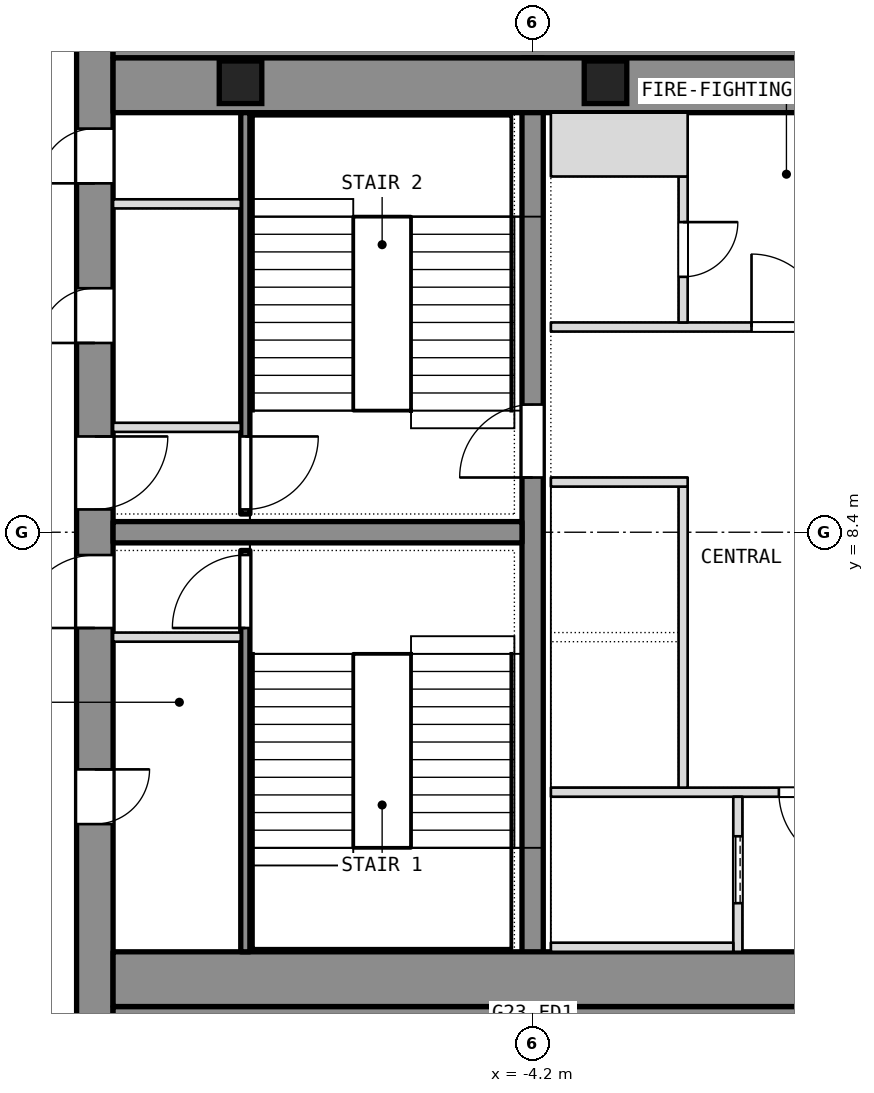
"""IFC4 building model, lengths in metres.
Left out: names, types, materials, properties, quantities, classifications, styles, units other than length and angle.
Written with IfcOpenShell. Run it as: python <this file> out.ifc"""

import sys

from ifc_helpers import new_model, si_unit, direction, frame, frame_2d, origin, origin_2d, place, context, subcontext, project, spatial, rectangle, extrude, element, fill, save


model = new_model("IFC4")
c1 = context("Model", 3, precision=1e-05, world=origin(), true_north=direction((0.0, 1.0)))
c2 = subcontext(c1, "Body", "Model", "MODEL_VIEW")
j1 = project(units=[si_unit("LENGTHUNIT", "METRE"), si_unit("PLANEANGLEUNIT", "RADIAN")], contexts=[c1])
p1 = place(None, origin())
s1 = spatial("IfcSite", under=j1, at=p1, CompositionType="ELEMENT")
p2 = place(p1, origin())
s2 = spatial("IfcBuilding", under=s1, at=p2, CompositionType="ELEMENT")
p3 = place(p2, frame((0.0, 0.0, 270.5)))
s3 = spatial("IfcBuildingStorey", under=s2, at=p3, CompositionType="ELEMENT", Elevation=270.5)
p4 = place(p3, frame((-11.4, 0.0, 0.0), z_axis=(0.0, 0.0, 1.0), x_axis=(0.0, 1.0, 0.0)))
e1 = element("IfcWall", 1, at=p4, inside=s3, PredefinedType="SHEAR", context=c2, shape_type="SweptSolid", body=[
    extrude(rectangle(XDim=16.8, YDim=0.6, at=frame_2d((8.4, 0.0))), origin(), (0.0, 0.0, 1.0), 3.6),
])
p5 = place(p4, frame((3.6, 0.0, 0.0)))
e2 = element("IfcOpeningElement", 2, at=p5, cuts=e1, PredefinedType="OPENING", context=c2, shape_type="SweptSolid", body=[
    extrude(rectangle(XDim=0.9, YDim=2.1, at=frame_2d((0.45, 1.05))), frame((0.0, 0.3, 0.0), z_axis=(0.0, -1.0, 0.0), x_axis=(1.0, 0.0, 0.0)), (0.0, 0.0, 1.0), 0.6),
])
p6 = place(p4, frame((6.825, 0.0, 0.0)))
e3 = element("IfcOpeningElement", 3, at=p6, cuts=e1, PredefinedType="OPENING", context=c2, shape_type="SweptSolid", body=[
    extrude(rectangle(XDim=1.2, YDim=2.1, at=frame_2d((0.6, 1.05))), frame((0.0, 0.3, 0.0), z_axis=(0.0, -1.0, 0.0), x_axis=(1.0, 0.0, 0.0)), (0.0, 0.0, 1.0), 0.6),
])
p7 = place(p4, frame((14.137, 0.0, 0.0)))
e4 = element("IfcOpeningElement", 4, at=p7, cuts=e1, PredefinedType="OPENING", context=c2, shape_type="SweptSolid", body=[
    extrude(rectangle(XDim=0.9, YDim=2.1, at=frame_2d((0.45, 1.05))), frame((0.0, 0.3, 0.0), z_axis=(0.0, -1.0, 0.0), x_axis=(1.0, 0.0, 0.0)), (0.0, 0.0, 1.0), 0.6),
])
p8 = place(p4, frame((11.512, 0.0, 0.0)))
e5 = element("IfcOpeningElement", 5, at=p8, cuts=e1, PredefinedType="OPENING", context=c2, shape_type="SweptSolid", body=[
    extrude(rectangle(XDim=0.9, YDim=2.1, at=frame_2d((0.45, 1.05))), frame((0.0, 0.3, 0.0), z_axis=(0.0, -1.0, 0.0), x_axis=(1.0, 0.0, 0.0)), (0.0, 0.0, 1.0), 0.6),
])
p9 = place(p4, frame((8.775, 0.0, 0.0)))
e6 = element("IfcOpeningElement", 6, at=p9, cuts=e1, PredefinedType="OPENING", context=c2, shape_type="SweptSolid", body=[
    extrude(rectangle(XDim=1.2, YDim=2.1, at=frame_2d((0.6, 1.05))), frame((0.0, 0.3, 0.0), z_axis=(0.0, -1.0, 0.0), x_axis=(1.0, 0.0, 0.0)), (0.0, 0.0, 1.0), 0.6),
])
for number, where, z_axis, x_axis in (
    (7, (-11.1, 0.3, 0.0), (0.0, 0.0, 1.0), (1.0, 0.0, 0.0)),
    (8, (-11.1, 16.5, 0.0), (0.0, 0.0, 1.0), (1.0, 0.0, 0.0)),
):
    element("IfcWall", number, at=place(p3, frame(where, z_axis=z_axis, x_axis=x_axis)), inside=s3, PredefinedType="SHEAR", context=c2, shape_type="SweptSolid", body=[
        extrude(rectangle(XDim=22.2, YDim=0.6, at=frame_2d((11.1, 0.0))), origin(), (0.0, 0.0, 1.0), 3.6),
    ])
p10 = place(p3, frame((-4.2, 0.6, 0.0), z_axis=(0.0, 0.0, 1.0), x_axis=(0.0, 1.0, 0.0)))
e9 = element("IfcWall", 9, at=p10, inside=s3, PredefinedType="SHEAR", context=c2, shape_type="SweptSolid", body=[
    extrude(rectangle(XDim=15.6, YDim=0.35, at=frame_2d((7.8, 0.0))), origin(), (0.0, 0.0, 1.0), 3.6),
])
p11 = place(p10, frame((8.7, 0.0, 0.0)))
e10 = element("IfcOpeningElement", 10, at=p11, cuts=e9, PredefinedType="OPENING", context=c2, shape_type="SweptSolid", body=[
    extrude(rectangle(XDim=1.2, YDim=2.1, at=frame_2d((0.6, 1.05))), frame((0.0, 0.175, 0.0), z_axis=(0.0, -1.0, 0.0), x_axis=(1.0, 0.0, 0.0)), (0.0, 0.0, 1.0), 0.35),
])
p12 = place(p3, frame((-11.1, 8.4, 0.0), z_axis=(0.0, 0.0, 1.0), x_axis=(1.0, 0.0, 0.0)))
e11 = element("IfcWall", 11, at=p12, inside=s3, PredefinedType="SHEAR", context=c2, shape_type="SweptSolid", body=[
    extrude(rectangle(XDim=6.725, YDim=0.35, at=frame_2d((3.363, 0.0))), origin(), (0.0, 0.0, 1.0), 3.6),
])
for number, where, z_axis, x_axis in (
    (12, (-9.004, 15.8, 0.0), (0.0, 0.0, 1.0), (1.0, 0.0, 0.0)),
    (13, (-3.001, 15.8, 0.0), (0.0, 0.0, 1.0), (1.0, 0.0, 0.0)),
):
    element("IfcColumn", number, at=place(p3, frame(where, z_axis=z_axis, x_axis=x_axis)), inside=s3, PredefinedType="COLUMN", context=c2, shape_type="SweptSolid", body=[
        extrude(rectangle(XDim=0.7, YDim=0.7, at=origin_2d()), origin(), (0.0, 0.0, 1.0), 3.6),
    ])
for number, where, z_axis, x_axis in (
    (14, (-11.1, 1.05, 0.0), (0.0, 0.0, 1.0), (1.0, 0.0, 0.0)),
    (15, (-11.1, 15.75, 0.0), (0.0, 0.0, 1.0), (1.0, 0.0, 0.0)),
):
    element("IfcWall", number, at=place(p3, frame(where, z_axis=z_axis, x_axis=x_axis)), inside=s3, PredefinedType="PARTITIONING", context=c2, shape_type="SweptSolid", body=[
        extrude(rectangle(XDim=22.2, YDim=0.9, at=frame_2d((11.1, 0.0))), origin(), (0.0, 0.0, 1.0), 3.34),
    ])
p13 = place(p3, frame((-8.925, 1.5, 0.0), z_axis=(0.0, 0.0, 1.0), x_axis=(0.0, 1.0, 0.0)))
e16 = element("IfcWall", 16, at=p13, inside=s3, PredefinedType="SHEAR", context=c2, shape_type="SweptSolid", body=[
    extrude(rectangle(XDim=6.6, YDim=0.15, at=frame_2d((3.3, 0.0))), origin(), (0.0, 0.0, 1.0), 3.34),
])
p14 = place(p13, frame((5.325, 0.0, 0.0)))
e17 = element("IfcOpeningElement", 17, at=p14, cuts=e16, PredefinedType="OPENING", context=c2, shape_type="SweptSolid", body=[
    extrude(rectangle(XDim=1.2, YDim=2.1, at=frame_2d((0.6, 1.05))), frame((0.0, 0.075, 0.0), z_axis=(0.0, -1.0, 0.0), x_axis=(1.0, 0.0, 0.0)), (0.0, 0.0, 1.0), 0.15),
])
p15 = place(p3, frame((-11.1, 6.675, 0.0), z_axis=(0.0, 0.0, 1.0), x_axis=(1.0, 0.0, 0.0)))
e18 = element("IfcWall", 18, at=p15, inside=s3, PredefinedType="PARTITIONING", context=c2, shape_type="SweptSolid", body=[
    extrude(rectangle(XDim=2.1, YDim=0.15, at=frame_2d((1.05, 0.0))), origin(), (0.0, 0.0, 1.0), 3.34),
])
p16 = place(p3, frame((-8.925, 8.7, 0.0), z_axis=(0.0, 0.0, 1.0), x_axis=(0.0, 1.0, 0.0)))
e19 = element("IfcWall", 19, at=p16, inside=s3, PredefinedType="SHEAR", context=c2, shape_type="SweptSolid", body=[
    extrude(rectangle(XDim=6.6, YDim=0.15, at=frame_2d((3.3, 0.0))), origin(), (0.0, 0.0, 1.0), 3.34),
])
p17 = place(p16, frame((0.075, 0.0, 0.0)))
e20 = element("IfcOpeningElement", 20, at=p17, cuts=e19, PredefinedType="OPENING", context=c2, shape_type="SweptSolid", body=[
    extrude(rectangle(XDim=1.2, YDim=2.1, at=frame_2d((0.6, 1.05))), frame((0.0, 0.075, 0.0), z_axis=(0.0, -1.0, 0.0), x_axis=(1.0, 0.0, 0.0)), (0.0, 0.0, 1.0), 0.15),
])
for number, where, z_axis, x_axis in (
    (21, (-11.1, 10.125, 0.0), (0.0, 0.0, 1.0), (1.0, 0.0, 0.0)),
    (22, (-11.1, 13.8, 0.0), (0.0, 0.0, 1.0), (1.0, 0.0, 0.0)),
):
    element("IfcWall", number, at=place(p3, frame(where, z_axis=z_axis, x_axis=x_axis)), inside=s3, PredefinedType="PARTITIONING", context=c2, shape_type="SweptSolid", body=[
        extrude(rectangle(XDim=2.1, YDim=0.15, at=frame_2d((1.05, 0.0))), origin(), (0.0, 0.0, 1.0), 3.34),
    ])
p18 = place(p3, frame((-3.9, 4.125, 0.0), z_axis=(0.0, 0.0, 1.0), x_axis=(1.0, 0.0, 0.0)))
e23 = element("IfcWall", 23, at=p18, inside=s3, PredefinedType="PARTITIONING", context=c2, shape_type="SweptSolid", body=[
    extrude(rectangle(XDim=7.8, YDim=0.15, at=frame_2d((3.9, 0.0))), origin(), (0.0, 0.0, 1.0), 3.34),
])
p19 = place(p18, frame((3.75, 0.0, 0.0)))
e24 = element("IfcOpeningElement", 24, at=p19, cuts=e23, PredefinedType="OPENING", context=c2, shape_type="SweptSolid", body=[
    extrude(rectangle(XDim=1.2, YDim=2.1, at=frame_2d((0.6, 1.05))), frame((0.0, 0.075, 0.0), z_axis=(0.0, -1.0, 0.0), x_axis=(1.0, 0.0, 0.0)), (0.0, 0.0, 1.0), 0.15),
])
p20 = place(p3, frame((-3.9, 11.775, 0.0), z_axis=(0.0, 0.0, 1.0), x_axis=(1.0, 0.0, 0.0)))
e25 = element("IfcWall", 25, at=p20, inside=s3, PredefinedType="PARTITIONING", context=c2, shape_type="SweptSolid", body=[
    extrude(rectangle(XDim=7.8, YDim=0.15, at=frame_2d((3.9, 0.0))), origin(), (0.0, 0.0, 1.0), 3.34),
])
p21 = place(p20, frame((3.3, 0.0, 0.0)))
e26 = element("IfcOpeningElement", 26, at=p21, cuts=e25, PredefinedType="OPENING", context=c2, shape_type="SweptSolid", body=[
    extrude(rectangle(XDim=1.2, YDim=2.1, at=frame_2d((0.6, 1.05))), frame((0.0, 0.075, 0.0), z_axis=(0.0, -1.0, 0.0), x_axis=(1.0, 0.0, 0.0)), (0.0, 0.0, 1.0), 0.15),
])
p22 = place(p3, frame((-0.825, 1.5, 0.0), z_axis=(0.0, 0.0, 1.0), x_axis=(0.0, 1.0, 0.0)))
e27 = element("IfcWall", 27, at=p22, inside=s3, PredefinedType="SHEAR", context=c2, shape_type="SweptSolid", body=[
    extrude(rectangle(XDim=2.55, YDim=0.15, at=frame_2d((1.275, 0.0))), origin(), (0.0, 0.0, 1.0), 3.6),
])
p23 = place(p22, frame((0.8, 0.0, 0.0)))
e28 = element("IfcOpeningElement", 28, at=p23, cuts=e27, PredefinedType="OPENING", context=c2, shape_type="SweptSolid", body=[
    extrude(rectangle(XDim=1.1, YDim=2.1, at=frame_2d((0.55, 1.05))), frame((0.0, 0.075, 0.0), z_axis=(0.0, -1.0, 0.0), x_axis=(1.0, 0.0, 0.0)), (0.0, 0.0, 1.0), 0.15),
])
p24 = place(p3, frame((-3.9, 1.575, 0.0), z_axis=(0.0, 0.0, 1.0), x_axis=(1.0, 0.0, 0.0)))
e29 = element("IfcWall", 29, at=p24, inside=s3, PredefinedType="SHEAR", context=c2, shape_type="SweptSolid", body=[
    extrude(rectangle(XDim=3.0, YDim=0.15, at=frame_2d((1.5, 0.0))), origin(), (0.0, 0.0, 1.0), 3.6),
])
p25 = place(p3, frame((-1.725, 4.2, 0.0), z_axis=(0.0, 0.0, 1.0), x_axis=(0.0, 1.0, 0.0)))
e30 = element("IfcWall", 30, at=p25, inside=s3, PredefinedType="SHEAR", context=c2, shape_type="SweptSolid", body=[
    extrude(rectangle(XDim=4.95, YDim=0.15, at=frame_2d((2.475, 0.0))), origin(), (0.0, 0.0, 1.0), 3.6),
])
p26 = place(p3, frame((-3.9, 9.225, 0.0), z_axis=(0.0, 0.0, 1.0), x_axis=(1.0, 0.0, 0.0)))
e31 = element("IfcWall", 31, at=p26, inside=s3, PredefinedType="SHEAR", context=c2, shape_type="SweptSolid", body=[
    extrude(rectangle(XDim=2.25, YDim=0.15, at=frame_2d((1.125, 0.0))), origin(), (0.0, 0.0, 1.0), 3.6),
])
p27 = place(p3, frame((-1.725, 11.85, 0.0), z_axis=(0.0, 0.0, 1.0), x_axis=(0.0, 1.0, 0.0)))
e32 = element("IfcWall", 32, at=p27, inside=s3, PredefinedType="PARTITIONING", context=c2, shape_type="SweptSolid", body=[
    extrude(rectangle(XDim=2.4, YDim=0.15, at=frame_2d((1.2, 0.0))), origin(), (0.0, 0.0, 1.0), 3.34),
])
p28 = place(p27, frame((0.75, 0.0, 0.0)))
e33 = element("IfcOpeningElement", 33, at=p28, cuts=e32, PredefinedType="OPENING", context=c2, shape_type="SweptSolid", body=[
    extrude(rectangle(XDim=0.9, YDim=2.1, at=frame_2d((0.45, 1.05))), frame((0.0, 0.075, 0.0), z_axis=(0.0, -1.0, 0.0), x_axis=(1.0, 0.0, 0.0)), (0.0, 0.0, 1.0), 0.15),
])
p29 = place(p3, frame((-3.9, 14.775, 0.0), z_axis=(0.0, 0.0, 1.0), x_axis=(1.0, 0.0, 0.0)))
e34 = element("IfcWall", 34, at=p29, inside=s3, PredefinedType="PARTITIONING", context=c2, shape_type="SweptSolid", body=[
    extrude(rectangle(XDim=2.25, YDim=1.05, at=frame_2d((1.125, 0.0))), origin(), (0.0, 0.0, 1.0), 3.34),
])
p30 = place(p5, origin())
e35 = element("IfcDoor", 35, at=p30, inside=s3, OperationType="SINGLE_SWING_LEFT", PredefinedType="DOOR", context=c2, shape_type="SweptSolid", body=[
    extrude(rectangle(XDim=0.9, YDim=2.1, at=frame_2d((0.45, 1.05))), frame((0.0, 0.025, 0.0), z_axis=(0.0, -1.0, 0.0), x_axis=(1.0, 0.0, 0.0)), (0.0, 0.0, 1.0), 0.05),
])
fill(e2, e35)
p31 = place(p6, origin())
e36 = element("IfcDoor", 36, at=p31, inside=s3, OperationType="SINGLE_SWING_LEFT", PredefinedType="DOOR", context=c2, shape_type="SweptSolid", body=[
    extrude(rectangle(XDim=1.2, YDim=2.1, at=frame_2d((0.6, 1.05))), frame((0.0, 0.025, 0.0), z_axis=(0.0, -1.0, 0.0), x_axis=(1.0, 0.0, 0.0)), (0.0, 0.0, 1.0), 0.05),
])
fill(e3, e36)
p32 = place(p14, origin())
e37 = element("IfcDoor", 37, at=p32, inside=s3, OperationType="SINGLE_SWING_LEFT", PredefinedType="DOOR", context=c2, shape_type="SweptSolid", body=[
    extrude(rectangle(XDim=1.2, YDim=2.1, at=frame_2d((0.6, 1.05))), frame((0.0, 0.025, 0.0), z_axis=(0.0, -1.0, 0.0), x_axis=(1.0, 0.0, 0.0)), (0.0, 0.0, 1.0), 0.05),
])
fill(e17, e37)
p33 = place(p7, origin())
e38 = element("IfcDoor", 38, at=p33, inside=s3, OperationType="SINGLE_SWING_LEFT", PredefinedType="DOOR", context=c2, shape_type="SweptSolid", body=[
    extrude(rectangle(XDim=0.9, YDim=2.1, at=frame_2d((0.45, 1.05))), frame((0.0, 0.025, 0.0), z_axis=(0.0, -1.0, 0.0), x_axis=(1.0, 0.0, 0.0)), (0.0, 0.0, 1.0), 0.05),
])
fill(e4, e38)
p34 = place(p8, origin())
e39 = element("IfcDoor", 39, at=p34, inside=s3, OperationType="SINGLE_SWING_LEFT", PredefinedType="DOOR", context=c2, shape_type="SweptSolid", body=[
    extrude(rectangle(XDim=0.9, YDim=2.1, at=frame_2d((0.45, 1.05))), frame((0.0, 0.025, 0.0), z_axis=(0.0, -1.0, 0.0), x_axis=(1.0, 0.0, 0.0)), (0.0, 0.0, 1.0), 0.05),
])
fill(e5, e39)
p35 = place(p9, origin())
e40 = element("IfcDoor", 40, at=p35, inside=s3, OperationType="SINGLE_SWING_LEFT", PredefinedType="DOOR", context=c2, shape_type="SweptSolid", body=[
    extrude(rectangle(XDim=1.2, YDim=2.1, at=frame_2d((0.6, 1.05))), frame((0.0, 0.025, 0.0), z_axis=(0.0, -1.0, 0.0), x_axis=(1.0, 0.0, 0.0)), (0.0, 0.0, 1.0), 0.05),
])
fill(e6, e40)
p36 = place(p17, origin())
e41 = element("IfcDoor", 41, at=p36, inside=s3, OperationType="SINGLE_SWING_LEFT", PredefinedType="DOOR", context=c2, shape_type="SweptSolid", body=[
    extrude(rectangle(XDim=1.2, YDim=2.1, at=frame_2d((0.6, 1.05))), frame((0.0, 0.025, 0.0), z_axis=(0.0, -1.0, 0.0), x_axis=(1.0, 0.0, 0.0)), (0.0, 0.0, 1.0), 0.05),
])
fill(e20, e41)
p37 = place(p23, origin())
e42 = element("IfcDoor", 42, at=p37, inside=s3, OperationType="SLIDING_TO_LEFT", PredefinedType="DOOR", context=c2, shape_type="SweptSolid", body=[
    extrude(rectangle(XDim=1.1, YDim=2.1, at=frame_2d((0.55, 1.05))), frame((0.0, 0.025, 0.0), z_axis=(0.0, -1.0, 0.0), x_axis=(1.0, 0.0, 0.0)), (0.0, 0.0, 1.0), 0.05),
])
fill(e28, e42)
p38 = place(p19, origin())
e43 = element("IfcDoor", 43, at=p38, inside=s3, OperationType="SINGLE_SWING_LEFT", PredefinedType="DOOR", context=c2, shape_type="SweptSolid", body=[
    extrude(rectangle(XDim=1.2, YDim=2.1, at=frame_2d((0.6, 1.05))), frame((0.0, 0.025, 0.0), z_axis=(0.0, -1.0, 0.0), x_axis=(1.0, 0.0, 0.0)), (0.0, 0.0, 1.0), 0.05),
])
fill(e24, e43)
p39 = place(p21, origin())
e44 = element("IfcDoor", 44, at=p39, inside=s3, OperationType="SINGLE_SWING_LEFT", PredefinedType="DOOR", context=c2, shape_type="SweptSolid", body=[
    extrude(rectangle(XDim=1.2, YDim=2.1, at=frame_2d((0.6, 1.05))), frame((0.0, 0.025, 0.0), z_axis=(0.0, -1.0, 0.0), x_axis=(1.0, 0.0, 0.0)), (0.0, 0.0, 1.0), 0.05),
])
fill(e26, e44)
p40 = place(p28, origin())
e45 = element("IfcDoor", 45, at=p40, inside=s3, OperationType="SINGLE_SWING_LEFT", PredefinedType="DOOR", context=c2, shape_type="SweptSolid", body=[
    extrude(rectangle(XDim=0.9, YDim=2.1, at=frame_2d((0.45, 1.05))), frame((0.0, 0.025, 0.0), z_axis=(0.0, -1.0, 0.0), x_axis=(1.0, 0.0, 0.0)), (0.0, 0.0, 1.0), 0.05),
])
fill(e33, e45)
p41 = place(p11, origin())
e46 = element("IfcDoor", 46, at=p41, inside=s3, OperationType="SINGLE_SWING_LEFT", PredefinedType="DOOR", context=c2, shape_type="SweptSolid", body=[
    extrude(rectangle(XDim=1.2, YDim=2.1, at=frame_2d((0.6, 1.05))), frame((0.0, 0.025, 0.0), z_axis=(0.0, -1.0, 0.0), x_axis=(1.0, 0.0, 0.0)), (0.0, 0.0, 1.0), 0.05),
])
fill(e10, e46)
save(model, sys.argv[1])
